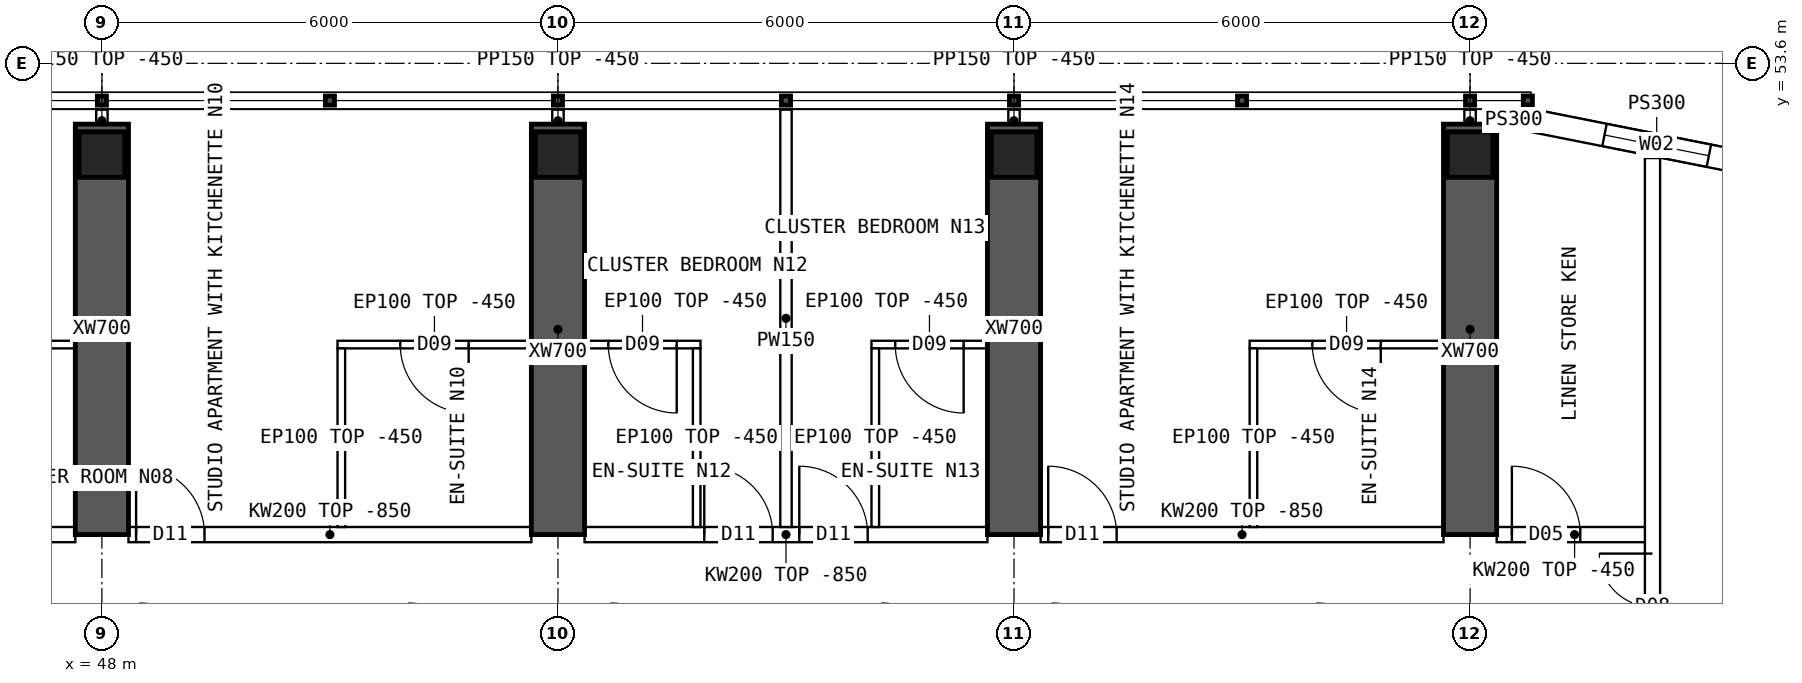
"""IFC4 building model, lengths in metres.
Left out: names, types, materials, properties, quantities, classifications, styles, units other than length and angle.
Written with IfcOpenShell. Run it as: python <this file> out.ifc"""

import sys

from ifc_helpers import new_model, si_unit, direction, frame, frame_2d, origin, origin_2d, place, context, subcontext, project, spatial, polyline, rectangle, hollow_rectangle, outline, extrude, element, fill, save


model = new_model("IFC4")
c1 = context("Model", 3, precision=1e-05, world=origin(), true_north=direction((0.0, 1.0)))
c2 = subcontext(c1, "Body", "Model", "MODEL_VIEW")
j1 = project(units=[si_unit("LENGTHUNIT", "METRE"), si_unit("PLANEANGLEUNIT", "RADIAN")], contexts=[c1])
p1 = place(None, origin())
s1 = spatial("IfcSite", under=j1, at=p1, CompositionType="ELEMENT")
p2 = place(p1, origin())
s2 = spatial("IfcBuilding", under=s1, at=p2, CompositionType="ELEMENT")
p3 = place(p2, frame((0.0, 0.0, 212.8)))
s3 = spatial("IfcBuildingStorey", under=s2, at=p3, CompositionType="ELEMENT", Elevation=212.8)
for number, where, z_axis, x_axis in (
    (1, (48.0, 52.4, 0.0), (0.0, 0.0, 1.0), (1.0, 0.0, 0.0)),
    (2, (54.0, 52.4, 0.0), (0.0, 0.0, 1.0), (1.0, 0.0, 0.0)),
    (3, (60.0, 52.4, 0.0), (0.0, 0.0, 1.0), (1.0, 0.0, 0.0)),
    (4, (66.0, 52.4, 0.0), (0.0, 0.0, 1.0), (1.0, 0.0, 0.0)),
):
    element("IfcColumn", number, at=place(p3, frame(where, z_axis=z_axis, x_axis=x_axis)), inside=s3, PredefinedType="COLUMN", context=c2, shape_type="SweptSolid", body=[
        extrude(hollow_rectangle(XDim=0.6, YDim=0.6, WallThickness=0.06, at=origin_2d()), origin(), (0.0, 0.0, 1.0), 3.75),
    ])
for number, where, z_axis, x_axis in (
    (5, (48.0, 47.4, 0.0), (0.0, 0.0, 1.0), (0.0, 1.0, 0.0)),
    (6, (54.0, 47.4, 0.0), (0.0, 0.0, 1.0), (0.0, 1.0, 0.0)),
    (7, (60.0, 47.4, 0.0), (0.0, 0.0, 1.0), (0.0, 1.0, 0.0)),
    (8, (66.0, 47.4, 0.0), (0.0, 0.0, 1.0), (0.0, 1.0, 0.0)),
):
    element("IfcWall", number, at=place(p3, frame(where, z_axis=z_axis, x_axis=x_axis)), inside=s3, PredefinedType="SHEAR", context=c2, shape_type="SweptSolid", body=[
        extrude(rectangle(XDim=5.4, YDim=0.7, at=frame_2d((2.7, 0.0))), origin(), (0.0, 0.0, 1.0), 3.75),
    ])
p4 = place(p3, frame((70.11, 52.192, 0.0), z_axis=(0.0, 0.0, 1.0), x_axis=(-0.98078325777, 0.195100490205, 0.0)))
e9 = element("IfcWall", 9, at=p4, inside=s3, PredefinedType="SOLIDWALL", context=c2, shape_type="SweptSolid", body=[
    extrude(outline(polyline([(-0.03, -0.15), (3.405, -0.15), (3.345, 0.15), (0.03, 0.15), (-0.03, -0.15)])), origin(), (0.0, 0.0, 1.0), 3.3),
])
p5 = place(p4, frame((0.988, 0.0, 0.9)))
e10 = element("IfcOpeningElement", 10, at=p5, cuts=e9, PredefinedType="OPENING", context=c2, shape_type="SweptSolid", body=[
    extrude(rectangle(XDim=1.4, YDim=1.8, at=frame_2d((0.7, 0.9))), frame((0.0, 0.16, 0.0), z_axis=(0.0, -1.0, 0.0), x_axis=(1.0, 0.0, 0.0)), (0.0, 0.0, 1.0), 0.32),
])
p6 = place(p3, frame((66.8, 52.85, 0.0), z_axis=(0.0, 0.0, 1.0), x_axis=(-1.0, 0.0, 0.0)))
e11 = element("IfcWall", 11, at=p6, inside=s3, PredefinedType="SOLIDWALL", context=c2, shape_type="SweptSolid", body=[
    extrude(rectangle(XDim=0.45, YDim=0.3, at=frame_2d((0.225, 0.0))), origin(), (0.0, 0.0, 1.0), 3.3),
])
p7 = place(p3, frame((42.35, 47.4, 0.0), z_axis=(0.0, 0.0, 1.0), x_axis=(1.0, 0.0, 0.0)))
e12 = element("IfcWall", 12, at=p7, inside=s3, PredefinedType="SOLIDWALL", context=c2, shape_type="SweptSolid", body=[
    extrude(outline(polyline([(0.0, 0.0), (5.3, 0.0), (5.3, 2.9), (0.0, 2.9), (0.0, 0.0)])), frame((0.0, 0.1, 0.0), z_axis=(0.0, -1.0, 0.0), x_axis=(1.0, 0.0, 0.0)), (0.0, 0.0, 1.0), 0.2),
])
p8 = place(p7, frame((2.3, 0.0, 0.0)))
e13 = element("IfcOpeningElement", 13, at=p8, cuts=e12, PredefinedType="OPENING", context=c2, shape_type="SweptSolid", body=[
    extrude(rectangle(XDim=0.9, YDim=2.1, at=frame_2d((0.45, 1.05))), frame((0.0, 0.11, 0.0), z_axis=(0.0, -1.0, 0.0), x_axis=(1.0, 0.0, 0.0)), (0.0, 0.0, 1.0), 0.22),
])
p9 = place(p3, frame((48.35, 47.4, 0.0), z_axis=(0.0, 0.0, 1.0), x_axis=(1.0, 0.0, 0.0)))
e14 = element("IfcWall", 14, at=p9, inside=s3, PredefinedType="SOLIDWALL", context=c2, shape_type="SweptSolid", body=[
    extrude(outline(polyline([(0.0, 0.0), (5.3, 0.0), (5.3, 2.9), (0.0, 2.9), (0.0, 0.0)])), frame((0.0, 0.1, 0.0), z_axis=(0.0, -1.0, 0.0), x_axis=(1.0, 0.0, 0.0)), (0.0, 0.0, 1.0), 0.2),
])
p10 = place(p9, frame((0.1, 0.0, 0.0)))
e15 = element("IfcOpeningElement", 15, at=p10, cuts=e14, PredefinedType="OPENING", context=c2, shape_type="SweptSolid", body=[
    extrude(rectangle(XDim=0.9, YDim=2.1, at=frame_2d((0.45, 1.05))), frame((0.0, 0.11, 0.0), z_axis=(0.0, -1.0, 0.0), x_axis=(1.0, 0.0, 0.0)), (0.0, 0.0, 1.0), 0.22),
])
p11 = place(p3, frame((54.35, 47.4, 0.0), z_axis=(0.0, 0.0, 1.0), x_axis=(1.0, 0.0, 0.0)))
e16 = element("IfcWall", 16, at=p11, inside=s3, PredefinedType="SOLIDWALL", context=c2, shape_type="SweptSolid", body=[
    extrude(outline(polyline([(0.0, 0.0), (5.3, 0.0), (5.3, 2.9), (0.0, 2.9), (0.0, 0.0)])), frame((0.0, 0.1, 0.0), z_axis=(0.0, -1.0, 0.0), x_axis=(1.0, 0.0, 0.0)), (0.0, 0.0, 1.0), 0.2),
])
p12 = place(p11, frame((1.575, 0.0, 0.0)))
e17 = element("IfcOpeningElement", 17, at=p12, cuts=e16, PredefinedType="OPENING", context=c2, shape_type="SweptSolid", body=[
    extrude(rectangle(XDim=0.9, YDim=2.1, at=frame_2d((0.45, 1.05))), frame((0.0, 0.11, 0.0), z_axis=(0.0, -1.0, 0.0), x_axis=(1.0, 0.0, 0.0)), (0.0, 0.0, 1.0), 0.22),
])
p13 = place(p11, frame((2.825, 0.0, 0.0)))
e18 = element("IfcOpeningElement", 18, at=p13, cuts=e16, PredefinedType="OPENING", context=c2, shape_type="SweptSolid", body=[
    extrude(rectangle(XDim=0.9, YDim=2.1, at=frame_2d((0.45, 1.05))), frame((0.0, 0.11, 0.0), z_axis=(0.0, -1.0, 0.0), x_axis=(1.0, 0.0, 0.0)), (0.0, 0.0, 1.0), 0.22),
])
p14 = place(p3, frame((60.35, 47.4, 0.0), z_axis=(0.0, 0.0, 1.0), x_axis=(1.0, 0.0, 0.0)))
e19 = element("IfcWall", 19, at=p14, inside=s3, PredefinedType="SOLIDWALL", context=c2, shape_type="SweptSolid", body=[
    extrude(outline(polyline([(0.0, 0.0), (5.3, 0.0), (5.3, 2.9), (0.0, 2.9), (0.0, 0.0)])), frame((0.0, 0.1, 0.0), z_axis=(0.0, -1.0, 0.0), x_axis=(1.0, 0.0, 0.0)), (0.0, 0.0, 1.0), 0.2),
])
p15 = place(p14, frame((0.1, 0.0, 0.0)))
e20 = element("IfcOpeningElement", 20, at=p15, cuts=e19, PredefinedType="OPENING", context=c2, shape_type="SweptSolid", body=[
    extrude(rectangle(XDim=0.9, YDim=2.1, at=frame_2d((0.45, 1.05))), frame((0.0, 0.11, 0.0), z_axis=(0.0, -1.0, 0.0), x_axis=(1.0, 0.0, 0.0)), (0.0, 0.0, 1.0), 0.22),
])
p16 = place(p3, frame((66.35, 47.4, 0.0), z_axis=(0.0, 0.0, 1.0), x_axis=(1.0, 0.0, 0.0)))
e21 = element("IfcWall", 21, at=p16, inside=s3, PredefinedType="SOLIDWALL", context=c2, shape_type="SweptSolid", body=[
    extrude(rectangle(XDim=2.05, YDim=0.2, at=frame_2d((1.025, 0.0))), origin(), (0.0, 0.0, 1.0), 3.3),
])
p17 = place(p16, frame((0.2, 0.0, 0.0)))
e22 = element("IfcOpeningElement", 22, at=p17, cuts=e21, PredefinedType="OPENING", context=c2, shape_type="SweptSolid", body=[
    extrude(rectangle(XDim=0.9, YDim=2.1, at=frame_2d((0.45, 1.05))), frame((0.0, 0.11, 0.0), z_axis=(0.0, -1.0, 0.0), x_axis=(1.0, 0.0, 0.0)), (0.0, 0.0, 1.0), 0.22),
])
p18 = place(p3, frame((44.5, 49.9, 0.0), z_axis=(0.0, 0.0, 1.0), x_axis=(1.0, 0.0, 0.0)))
e23 = element("IfcWall", 23, at=p18, inside=s3, PredefinedType="PARTITIONING", context=c2, shape_type="SweptSolid", body=[
    extrude(rectangle(XDim=3.15, YDim=0.1, at=frame_2d((1.575, 0.0))), origin(), (0.0, 0.0, 1.0), 3.3),
])
p19 = place(p18, frame((0.25, 0.0, 0.0)))
e24 = element("IfcOpeningElement", 24, at=p19, cuts=e23, PredefinedType="OPENING", context=c2, shape_type="SweptSolid", body=[
    extrude(rectangle(XDim=0.8, YDim=2.1, at=frame_2d((0.4, 1.05))), frame((0.0, 0.06, 0.0), z_axis=(0.0, -1.0, 0.0), x_axis=(1.0, 0.0, 0.0)), (0.0, 0.0, 1.0), 0.12),
])
p20 = place(p3, frame((51.1, 49.9, 0.0), z_axis=(0.0, 0.0, 1.0), x_axis=(1.0, 0.0, 0.0)))
e25 = element("IfcWall", 25, at=p20, inside=s3, PredefinedType="PARTITIONING", context=c2, shape_type="SweptSolid", body=[
    extrude(rectangle(XDim=2.55, YDim=0.1, at=frame_2d((1.275, 0.0))), origin(), (0.0, 0.0, 1.0), 3.3),
])
p21 = place(p20, frame((0.825, 0.0, 0.0)))
e26 = element("IfcOpeningElement", 26, at=p21, cuts=e25, PredefinedType="OPENING", context=c2, shape_type="SweptSolid", body=[
    extrude(rectangle(XDim=0.9, YDim=2.1, at=frame_2d((0.45, 1.05))), frame((0.0, 0.06, 0.0), z_axis=(0.0, -1.0, 0.0), x_axis=(1.0, 0.0, 0.0)), (0.0, 0.0, 1.0), 0.12),
])
p22 = place(p3, frame((51.15, 49.85, 0.0), z_axis=(0.0, 0.0, 1.0), x_axis=(0.0, -1.0, 0.0)))
e27 = element("IfcWall", 27, at=p22, inside=s3, PredefinedType="PARTITIONING", context=c2, shape_type="SweptSolid", body=[
    extrude(outline(polyline([(0.0, 0.0), (2.35, 0.0), (2.35, 2.9), (2.302, 2.9), (2.3, 3.3), (0.0, 3.3), (0.0, 0.0)])), frame((0.0, 0.05, 0.0), z_axis=(0.0, -1.0, 0.0), x_axis=(1.0, 0.0, 0.0)), (0.0, 0.0, 1.0), 0.1),
])
p23 = place(p3, frame((57.0, 52.99, 0.0), z_axis=(0.0, 0.0, 1.0), x_axis=(0.0, -1.0, 0.0)))
e28 = element("IfcWall", 28, at=p23, inside=s3, PredefinedType="PARTITIONING", context=c2, shape_type="SweptSolid", body=[
    extrude(outline(polyline([(0.0, 0.0), (5.49, 0.0), (5.49, 2.9), (5.442, 2.9), (5.44, 3.3), (0.792, 3.3), (0.79, 2.9), (0.392, 2.9), (0.39, 3.3), (0.0, 3.3), (0.0, 0.0)])), frame((0.0, 0.075, 0.0), z_axis=(0.0, -1.0, 0.0), x_axis=(1.0, 0.0, 0.0)), (0.0, 0.0, 1.0), 0.15),
])
p24 = place(p3, frame((54.35, 49.9, 0.0), z_axis=(0.0, 0.0, 1.0), x_axis=(1.0, 0.0, 0.0)))
e29 = element("IfcWall", 29, at=p24, inside=s3, PredefinedType="PARTITIONING", context=c2, shape_type="SweptSolid", body=[
    extrude(rectangle(XDim=1.525, YDim=0.1, at=frame_2d((0.762, 0.0))), origin(), (0.0, 0.0, 1.0), 3.3),
])
p25 = place(p24, frame((0.312, 0.0, 0.0)))
e30 = element("IfcOpeningElement", 30, at=p25, cuts=e29, PredefinedType="OPENING", context=c2, shape_type="SweptSolid", body=[
    extrude(rectangle(XDim=0.9, YDim=2.1, at=frame_2d((0.45, 1.05))), frame((0.0, 0.06, 0.0), z_axis=(0.0, -1.0, 0.0), x_axis=(1.0, 0.0, 0.0)), (0.0, 0.0, 1.0), 0.12),
])
p26 = place(p3, frame((55.825, 49.85, 0.0), z_axis=(0.0, 0.0, 1.0), x_axis=(0.0, -1.0, 0.0)))
e31 = element("IfcWall", 31, at=p26, inside=s3, PredefinedType="PARTITIONING", context=c2, shape_type="SweptSolid", body=[
    extrude(outline(polyline([(0.0, 0.0), (2.35, 0.0), (2.35, 2.9), (2.302, 2.9), (2.3, 3.3), (0.0, 3.3), (0.0, 0.0)])), frame((0.0, 0.05, 0.0), z_axis=(0.0, -1.0, 0.0), x_axis=(1.0, 0.0, 0.0)), (0.0, 0.0, 1.0), 0.1),
])
p27 = place(p3, frame((58.125, 49.9, 0.0), z_axis=(0.0, 0.0, 1.0), x_axis=(1.0, 0.0, 0.0)))
e32 = element("IfcWall", 32, at=p27, inside=s3, PredefinedType="PARTITIONING", context=c2, shape_type="SweptSolid", body=[
    extrude(rectangle(XDim=1.525, YDim=0.1, at=frame_2d((0.762, 0.0))), origin(), (0.0, 0.0, 1.0), 3.3),
])
p28 = place(p27, frame((0.312, 0.0, 0.0)))
e33 = element("IfcOpeningElement", 33, at=p28, cuts=e32, PredefinedType="OPENING", context=c2, shape_type="SweptSolid", body=[
    extrude(rectangle(XDim=0.9, YDim=2.1, at=frame_2d((0.45, 1.05))), frame((0.0, 0.06, 0.0), z_axis=(0.0, -1.0, 0.0), x_axis=(1.0, 0.0, 0.0)), (0.0, 0.0, 1.0), 0.12),
])
p29 = place(p3, frame((58.175, 49.85, 0.0), z_axis=(0.0, 0.0, 1.0), x_axis=(0.0, -1.0, 0.0)))
e34 = element("IfcWall", 34, at=p29, inside=s3, PredefinedType="PARTITIONING", context=c2, shape_type="SweptSolid", body=[
    extrude(outline(polyline([(0.0, 0.0), (2.35, 0.0), (2.35, 2.9), (2.302, 2.9), (2.3, 3.3), (0.0, 3.3), (0.0, 0.0)])), frame((0.0, 0.05, 0.0), z_axis=(0.0, -1.0, 0.0), x_axis=(1.0, 0.0, 0.0)), (0.0, 0.0, 1.0), 0.1),
])
p30 = place(p3, frame((63.1, 49.9, 0.0), z_axis=(0.0, 0.0, 1.0), x_axis=(1.0, 0.0, 0.0)))
e35 = element("IfcWall", 35, at=p30, inside=s3, PredefinedType="PARTITIONING", context=c2, shape_type="SweptSolid", body=[
    extrude(rectangle(XDim=2.55, YDim=0.1, at=frame_2d((1.275, 0.0))), origin(), (0.0, 0.0, 1.0), 3.3),
])
p31 = place(p30, frame((0.825, 0.0, 0.0)))
e36 = element("IfcOpeningElement", 36, at=p31, cuts=e35, PredefinedType="OPENING", context=c2, shape_type="SweptSolid", body=[
    extrude(rectangle(XDim=0.9, YDim=2.1, at=frame_2d((0.45, 1.05))), frame((0.0, 0.06, 0.0), z_axis=(0.0, -1.0, 0.0), x_axis=(1.0, 0.0, 0.0)), (0.0, 0.0, 1.0), 0.12),
])
p32 = place(p3, frame((63.15, 49.85, 0.0), z_axis=(0.0, 0.0, 1.0), x_axis=(0.0, -1.0, 0.0)))
e37 = element("IfcWall", 37, at=p32, inside=s3, PredefinedType="PARTITIONING", context=c2, shape_type="SweptSolid", body=[
    extrude(outline(polyline([(0.0, 0.0), (2.35, 0.0), (2.35, 2.9), (2.302, 2.9), (2.3, 3.3), (0.0, 3.3), (0.0, 0.0)])), frame((0.0, 0.05, 0.0), z_axis=(0.0, -1.0, 0.0), x_axis=(1.0, 0.0, 0.0)), (0.0, 0.0, 1.0), 0.1),
])
p33 = place(p3, frame((68.4, 11.646, 0.0), z_axis=(0.0, 0.0, 1.0), x_axis=(0.0, 1.0, 0.0)))
e38 = element("IfcWall", 38, at=p33, inside=s3, PredefinedType="SOLIDWALL", context=c2, shape_type="SweptSolid", body=[
    extrude(rectangle(XDim=40.708, YDim=0.2, at=frame_2d((20.354, 0.0))), origin(), (0.0, 0.0, 1.0), 3.3),
])
p34 = place(p33, frame((13.434, 0.0, 0.0)))
e39 = element("IfcOpeningElement", 39, at=p34, cuts=e38, PredefinedType="OPENING", context=c2, shape_type="SweptSolid", body=[
    extrude(rectangle(XDim=1.2, YDim=2.1, at=frame_2d((0.6, 1.05))), frame((0.0, 0.11, 0.0), z_axis=(0.0, -1.0, 0.0), x_axis=(1.0, 0.0, 0.0)), (0.0, 0.0, 1.0), 0.22),
])
p35 = place(p33, frame((26.074, 0.0, 0.0)))
e40 = element("IfcOpeningElement", 40, at=p35, cuts=e38, PredefinedType="OPENING", context=c2, shape_type="SweptSolid", body=[
    extrude(rectangle(XDim=1.2, YDim=2.1, at=frame_2d((0.6, 1.05))), frame((0.0, 0.11, 0.0), z_axis=(0.0, -1.0, 0.0), x_axis=(1.0, 0.0, 0.0)), (0.0, 0.0, 1.0), 0.22),
])
p36 = place(p33, frame((5.104, 0.0, 0.0)))
e41 = element("IfcOpeningElement", 41, at=p36, cuts=e38, PredefinedType="OPENING", context=c2, shape_type="SweptSolid", body=[
    extrude(rectangle(XDim=1.4, YDim=2.1, at=frame_2d((0.7, 1.05))), frame((0.0, 0.11, 0.0), z_axis=(0.0, -1.0, 0.0), x_axis=(1.0, 0.0, 0.0)), (0.0, 0.0, 1.0), 0.22),
])
p37 = place(p33, frame((34.104, 0.0, 0.0)))
e42 = element("IfcOpeningElement", 42, at=p37, cuts=e38, PredefinedType="OPENING", context=c2, shape_type="SweptSolid", body=[
    extrude(rectangle(XDim=1.4, YDim=2.1, at=frame_2d((0.7, 1.05))), frame((0.0, 0.11, 0.0), z_axis=(0.0, -1.0, 0.0), x_axis=(1.0, 0.0, 0.0)), (0.0, 0.0, 1.0), 0.22),
])
for number, where, z_axis, x_axis in (
    (43, (48.0, 52.7, 0.0), (0.0, 0.0, 1.0), (0.0, 1.0, 0.0)),
    (44, (54.0, 52.7, 0.0), (0.0, 0.0, 1.0), (0.0, 1.0, 0.0)),
    (45, (60.0, 52.7, 0.0), (0.0, 0.0, 1.0), (0.0, 1.0, 0.0)),
    (46, (66.0, 52.7, 0.0), (0.0, 0.0, 1.0), (0.0, 1.0, 0.0)),
):
    element("IfcWall", number, at=place(p3, frame(where, z_axis=z_axis, x_axis=x_axis)), inside=s3, PredefinedType="PARTITIONING", context=c2, shape_type="SweptSolid", body=[
        extrude(rectangle(XDim=0.29, YDim=0.15, at=frame_2d((0.145, 0.0))), origin(), (0.0, 0.0, 1.0), 3.3),
    ])
p38 = place(p5, origin())
e47 = element("IfcWindow", 47, at=p38, inside=s3, PartitioningType="SINGLE_PANEL", PredefinedType="WINDOW", context=c2, shape_type="SweptSolid", body=[
    extrude(rectangle(XDim=1.4, YDim=1.8, at=frame_2d((0.7, 0.9))), frame((0.0, 0.03, 0.0), z_axis=(0.0, -1.0, 0.0), x_axis=(1.0, 0.0, 0.0)), (0.0, 0.0, 1.0), 0.06),
])
fill(e10, e47)
p39 = place(p21, origin())
e48 = element("IfcDoor", 48, at=p39, inside=s3, OperationType="SINGLE_SWING_RIGHT", PredefinedType="DOOR", context=c2, shape_type="SweptSolid", body=[
    extrude(rectangle(XDim=0.9, YDim=2.1, at=frame_2d((0.45, 1.05))), frame((0.0, 0.025, 0.0), z_axis=(0.0, -1.0, 0.0), x_axis=(1.0, 0.0, 0.0)), (0.0, 0.0, 1.0), 0.05),
])
fill(e26, e48)
p40 = place(p10, origin())
e49 = element("IfcDoor", 49, at=p40, inside=s3, OperationType="SINGLE_SWING_LEFT", PredefinedType="DOOR", context=c2, shape_type="SweptSolid", body=[
    extrude(rectangle(XDim=0.9, YDim=2.1, at=frame_2d((0.45, 1.05))), frame((0.0, 0.025, 0.0), z_axis=(0.0, -1.0, 0.0), x_axis=(1.0, 0.0, 0.0)), (0.0, 0.0, 1.0), 0.05),
])
fill(e15, e49)
p41 = place(p25, origin())
e50 = element("IfcDoor", 50, at=p41, inside=s3, OperationType="SINGLE_SWING_RIGHT", PredefinedType="DOOR", context=c2, shape_type="SweptSolid", body=[
    extrude(rectangle(XDim=0.9, YDim=2.1, at=frame_2d((0.45, 1.05))), frame((0.0, 0.025, 0.0), z_axis=(0.0, -1.0, 0.0), x_axis=(1.0, 0.0, 0.0)), (0.0, 0.0, 1.0), 0.05),
])
fill(e30, e50)
p42 = place(p12, origin())
e51 = element("IfcDoor", 51, at=p42, inside=s3, OperationType="SINGLE_SWING_LEFT", PredefinedType="DOOR", context=c2, shape_type="SweptSolid", body=[
    extrude(rectangle(XDim=0.9, YDim=2.1, at=frame_2d((0.45, 1.05))), frame((0.0, 0.025, 0.0), z_axis=(0.0, -1.0, 0.0), x_axis=(1.0, 0.0, 0.0)), (0.0, 0.0, 1.0), 0.05),
])
fill(e17, e51)
p43 = place(p28, origin())
e52 = element("IfcDoor", 52, at=p43, inside=s3, OperationType="SINGLE_SWING_RIGHT", PredefinedType="DOOR", context=c2, shape_type="SweptSolid", body=[
    extrude(rectangle(XDim=0.9, YDim=2.1, at=frame_2d((0.45, 1.05))), frame((0.0, 0.025, 0.0), z_axis=(0.0, -1.0, 0.0), x_axis=(1.0, 0.0, 0.0)), (0.0, 0.0, 1.0), 0.05),
])
fill(e33, e52)
p44 = place(p13, origin())
e53 = element("IfcDoor", 53, at=p44, inside=s3, OperationType="SINGLE_SWING_LEFT", PredefinedType="DOOR", context=c2, shape_type="SweptSolid", body=[
    extrude(rectangle(XDim=0.9, YDim=2.1, at=frame_2d((0.45, 1.05))), frame((0.0, 0.025, 0.0), z_axis=(0.0, -1.0, 0.0), x_axis=(1.0, 0.0, 0.0)), (0.0, 0.0, 1.0), 0.05),
])
fill(e18, e53)
p45 = place(p31, origin())
e54 = element("IfcDoor", 54, at=p45, inside=s3, OperationType="SINGLE_SWING_RIGHT", PredefinedType="DOOR", context=c2, shape_type="SweptSolid", body=[
    extrude(rectangle(XDim=0.9, YDim=2.1, at=frame_2d((0.45, 1.05))), frame((0.0, 0.025, 0.0), z_axis=(0.0, -1.0, 0.0), x_axis=(1.0, 0.0, 0.0)), (0.0, 0.0, 1.0), 0.05),
])
fill(e36, e54)
p46 = place(p15, origin())
e55 = element("IfcDoor", 55, at=p46, inside=s3, OperationType="SINGLE_SWING_LEFT", PredefinedType="DOOR", context=c2, shape_type="SweptSolid", body=[
    extrude(rectangle(XDim=0.9, YDim=2.1, at=frame_2d((0.45, 1.05))), frame((0.0, 0.025, 0.0), z_axis=(0.0, -1.0, 0.0), x_axis=(1.0, 0.0, 0.0)), (0.0, 0.0, 1.0), 0.05),
])
fill(e20, e55)
p47 = place(p37, origin())
e56 = element("IfcDoor", 56, at=p47, inside=s3, OperationType="DOUBLE_DOOR_SINGLE_SWING", PredefinedType="DOOR", context=c2, shape_type="SweptSolid", body=[
    extrude(rectangle(XDim=1.4, YDim=2.1, at=frame_2d((0.7, 1.05))), frame((0.0, 0.025, 0.0), z_axis=(0.0, -1.0, 0.0), x_axis=(1.0, 0.0, 0.0)), (0.0, 0.0, 1.0), 0.05),
])
fill(e42, e56)
p48 = place(p17, origin())
e57 = element("IfcDoor", 57, at=p48, inside=s3, OperationType="SINGLE_SWING_LEFT", PredefinedType="DOOR", context=c2, shape_type="SweptSolid", body=[
    extrude(rectangle(XDim=0.9, YDim=2.1, at=frame_2d((0.45, 1.05))), frame((0.0, 0.025, 0.0), z_axis=(0.0, -1.0, 0.0), x_axis=(1.0, 0.0, 0.0)), (0.0, 0.0, 1.0), 0.05),
])
fill(e22, e57)
save(model, sys.argv[1])
